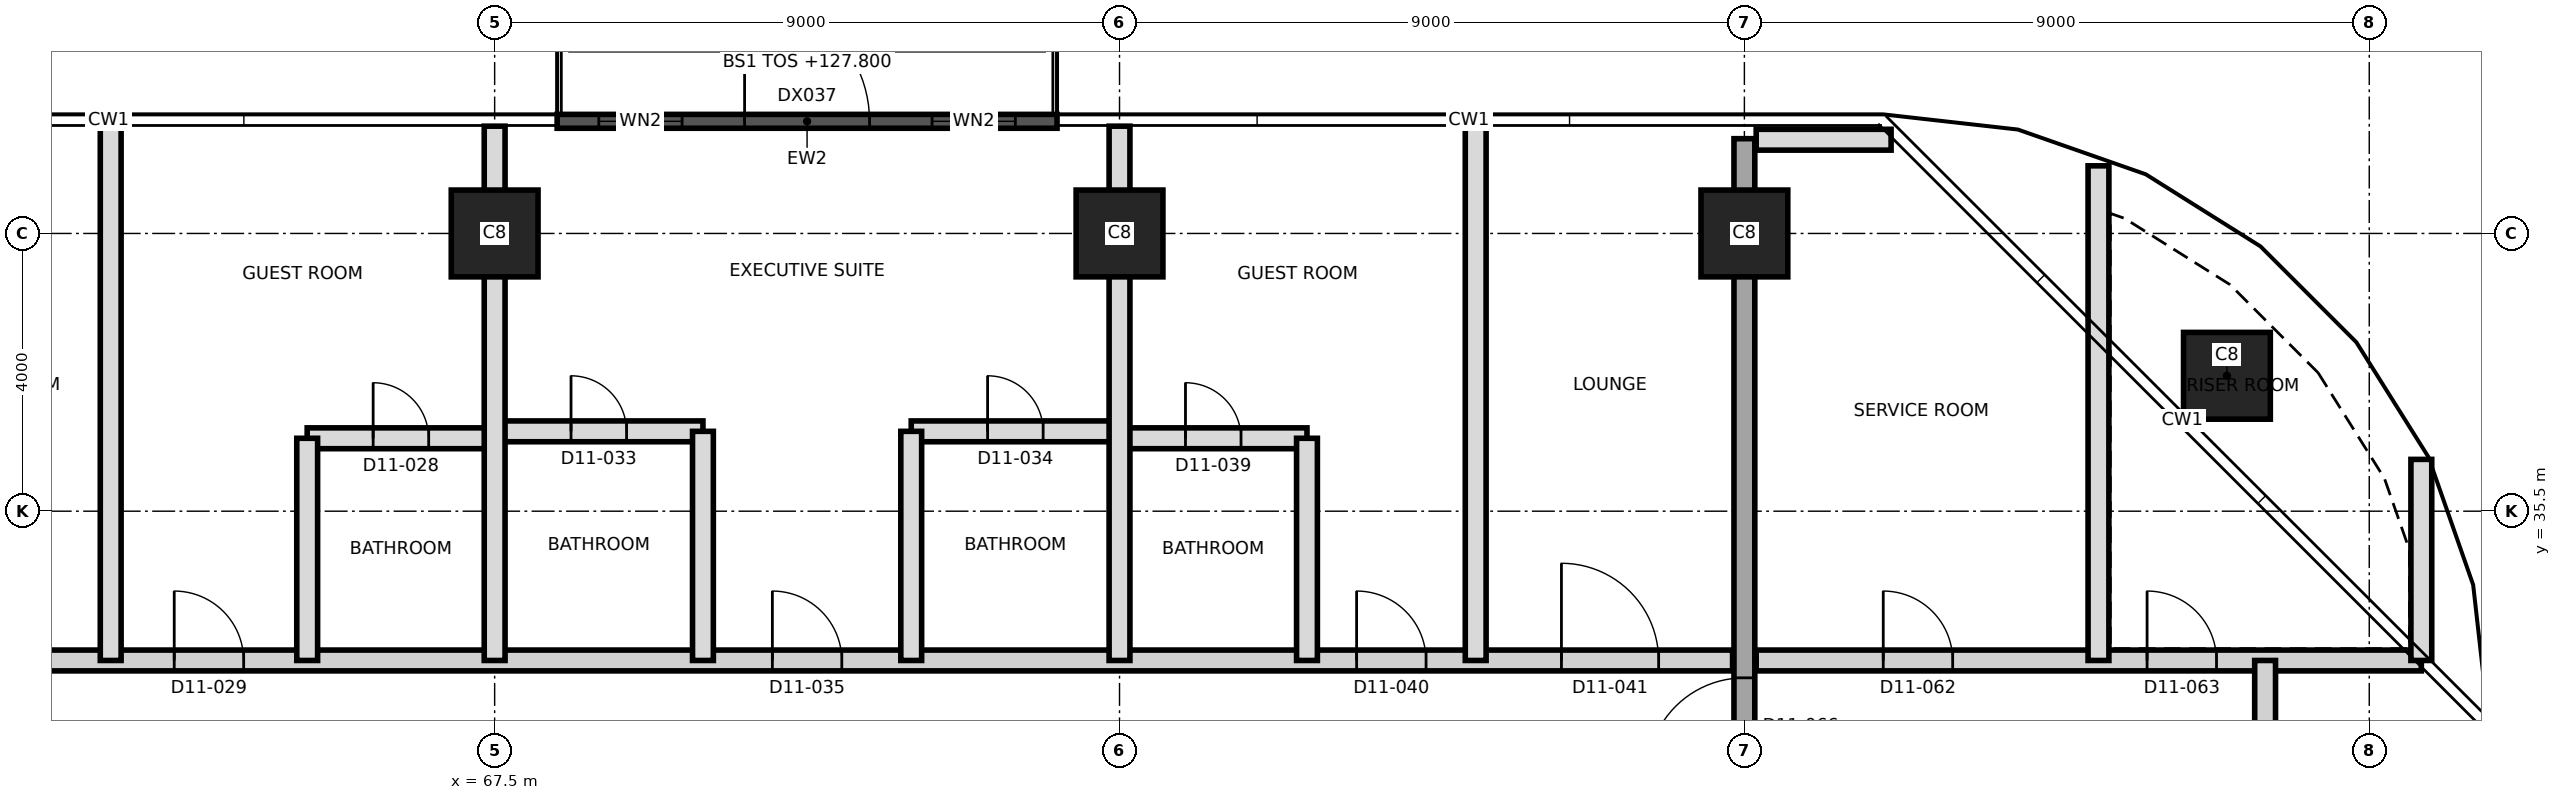
"""IFC4 building model, lengths in metres.
Left out: names, types, materials, properties, quantities, classifications, styles, units other than length and angle.
Written with IfcOpenShell. Run it as: python <this file> out.ifc"""

import sys

from ifc_helpers import new_model, si_unit, direction, frame, frame_2d, origin, origin_2d, place, context, subcontext, project, spatial, rectangle, extrude, element, fill, save


model = new_model("IFC4")
c1 = context("Model", 3, precision=1e-05, world=origin(), true_north=direction((0.0, 1.0)))
c2 = subcontext(c1, "Body", "Model", "MODEL_VIEW")
j1 = project(units=[si_unit("LENGTHUNIT", "METRE"), si_unit("PLANEANGLEUNIT", "RADIAN")], contexts=[c1])
p1 = place(None, origin())
s1 = spatial("IfcSite", under=j1, at=p1, CompositionType="ELEMENT")
p2 = place(p1, origin())
s2 = spatial("IfcBuilding", under=s1, at=p2, CompositionType="ELEMENT")
p3 = place(p2, frame((0.0, 0.0, 127.8)))
s3 = spatial("IfcBuildingStorey", under=s2, at=p3, CompositionType="ELEMENT", Elevation=127.8)
for number, where, z_axis, x_axis in (
    (1, (92.45, 37.45, 0.0), (0.0, 0.0, 1.0), (1.0, 0.0, 0.0)),
    (2, (67.5, 39.5, 0.0), (0.0, 0.0, 1.0), (1.0, 0.0, 0.0)),
    (3, (76.5, 39.5, 0.0), (0.0, 0.0, 1.0), (1.0, 0.0, 0.0)),
    (4, (85.5, 39.5, 0.0), (0.0, 0.0, 1.0), (1.0, 0.0, 0.0)),
):
    element("IfcColumn", number, at=place(p3, frame(where, z_axis=z_axis, x_axis=x_axis)), inside=s3, PredefinedType="COLUMN", context=c2, shape_type="SweptSolid", body=[
        extrude(rectangle(XDim=1.25, YDim=1.25, at=origin_2d()), origin(), (0.0, 0.0, 1.0), 3.7),
    ])
p4 = place(p3, frame((85.5, 20.135, 0.0), z_axis=(0.0, 0.0, 1.0), x_axis=(0.0, 1.0, 0.0)))
e5 = element("IfcWall", 5, at=p4, inside=s3, PredefinedType="SHEAR", context=c2, shape_type="SweptSolid", body=[
    extrude(rectangle(XDim=20.73, YDim=0.3, at=frame_2d((10.365, 0.0))), origin(), (0.0, 0.0, 1.0), 3.7),
])
p5 = place(p4, frame((11.565, 0.0, 0.0)))
e6 = element("IfcOpeningElement", 6, at=p5, cuts=e5, PredefinedType="OPENING", context=c2, shape_type="SweptSolid", body=[
    extrude(rectangle(XDim=1.4, YDim=2.1, at=frame_2d((0.7, 1.05))), frame((0.0, 0.16, 0.0), z_axis=(0.0, -1.0, 0.0), x_axis=(1.0, 0.0, 0.0)), (0.0, 0.0, 1.0), 0.32),
])
p6 = place(p3, frame((68.4, 41.115, 0.0), z_axis=(0.0, 0.0, 1.0), x_axis=(1.0, 0.0, 0.0)))
e7 = element("IfcWall", 7, at=p6, inside=s3, PredefinedType="SOLIDWALL", context=c2, shape_type="SweptSolid", body=[
    extrude(rectangle(XDim=7.2, YDim=0.2, at=frame_2d((3.6, 0.0))), origin(), (0.0, 0.0, 1.0), 3.4),
])
p7 = place(p6, frame((2.7, 0.0, 0.0)))
e8 = element("IfcOpeningElement", 8, at=p7, cuts=e7, PredefinedType="OPENING", context=c2, shape_type="SweptSolid", body=[
    extrude(rectangle(XDim=1.8, YDim=2.4, at=frame_2d((0.9, 1.2))), frame((0.0, 0.11, 0.0), z_axis=(0.0, -1.0, 0.0), x_axis=(1.0, 0.0, 0.0)), (0.0, 0.0, 1.0), 0.22),
])
p8 = place(p6, frame((5.4, 0.0, 0.9)))
e9 = element("IfcOpeningElement", 9, at=p8, cuts=e7, PredefinedType="OPENING", context=c2, shape_type="SweptSolid", body=[
    extrude(rectangle(XDim=1.2, YDim=2.1, at=frame_2d((0.6, 1.05))), frame((0.0, 0.11, 0.0), z_axis=(0.0, -1.0, 0.0), x_axis=(1.0, 0.0, 0.0)), (0.0, 0.0, 1.0), 0.22),
])
p9 = place(p6, frame((0.6, 0.0, 0.9)))
e10 = element("IfcOpeningElement", 10, at=p9, cuts=e7, PredefinedType="OPENING", context=c2, shape_type="SweptSolid", body=[
    extrude(rectangle(XDim=1.2, YDim=2.1, at=frame_2d((0.6, 1.05))), frame((0.0, 0.11, 0.0), z_axis=(0.0, -1.0, 0.0), x_axis=(1.0, 0.0, 0.0)), (0.0, 0.0, 1.0), 0.22),
])
p10 = place(p3, frame((58.8, 33.35, 0.0), z_axis=(0.0, 0.0, 1.0), x_axis=(1.0, 0.0, 0.0)))
e11 = element("IfcWall", 11, at=p10, inside=s3, PredefinedType="PARTITIONING", context=c2, shape_type="SweptSolid", body=[
    extrude(rectangle(XDim=26.53, YDim=0.3, at=frame_2d((13.265, 0.0))), origin(), (0.0, 0.0, 1.0), 3.4),
])
p11 = place(p10, frame((0.835, 0.0, 0.0)))
e12 = element("IfcOpeningElement", 12, at=p11, cuts=e11, PredefinedType="OPENING", context=c2, shape_type="SweptSolid", body=[
    extrude(rectangle(XDim=1.2, YDim=2.1, at=frame_2d((0.6, 1.05))), frame((0.0, 0.16, 0.0), z_axis=(0.0, -1.0, 0.0), x_axis=(1.0, 0.0, 0.0)), (0.0, 0.0, 1.0), 0.32),
])
p12 = place(p10, frame((4.085, 0.0, 0.0)))
e13 = element("IfcOpeningElement", 13, at=p12, cuts=e11, PredefinedType="OPENING", context=c2, shape_type="SweptSolid", body=[
    extrude(rectangle(XDim=1.0, YDim=2.1, at=frame_2d((0.5, 1.05))), frame((0.0, 0.16, 0.0), z_axis=(0.0, -1.0, 0.0), x_axis=(1.0, 0.0, 0.0)), (0.0, 0.0, 1.0), 0.32),
])
p13 = place(p10, frame((12.7, 0.0, 0.0)))
e14 = element("IfcOpeningElement", 14, at=p13, cuts=e11, PredefinedType="OPENING", context=c2, shape_type="SweptSolid", body=[
    extrude(rectangle(XDim=1.0, YDim=2.4, at=frame_2d((0.5, 1.2))), frame((0.0, 0.16, 0.0), z_axis=(0.0, -1.0, 0.0), x_axis=(1.0, 0.0, 0.0)), (0.0, 0.0, 1.0), 0.32),
])
p14 = place(p10, frame((21.115, 0.0, 0.0)))
e15 = element("IfcOpeningElement", 15, at=p14, cuts=e11, PredefinedType="OPENING", context=c2, shape_type="SweptSolid", body=[
    extrude(rectangle(XDim=1.0, YDim=2.1, at=frame_2d((0.5, 1.05))), frame((0.0, 0.16, 0.0), z_axis=(0.0, -1.0, 0.0), x_axis=(1.0, 0.0, 0.0)), (0.0, 0.0, 1.0), 0.32),
])
p15 = place(p10, frame((24.065, 0.0, 0.0)))
e16 = element("IfcOpeningElement", 16, at=p15, cuts=e11, PredefinedType="OPENING", context=c2, shape_type="SweptSolid", body=[
    extrude(rectangle(XDim=1.4, YDim=2.1, at=frame_2d((0.7, 1.05))), frame((0.0, 0.16, 0.0), z_axis=(0.0, -1.0, 0.0), x_axis=(1.0, 0.0, 0.0)), (0.0, 0.0, 1.0), 0.32),
])
p16 = place(p3, frame((85.67, 33.35, 0.0), z_axis=(0.0, 0.0, 1.0), x_axis=(1.0, 0.0, 0.0)))
e17 = element("IfcWall", 17, at=p16, inside=s3, PredefinedType="PARTITIONING", context=c2, shape_type="SweptSolid", body=[
    extrude(rectangle(XDim=9.58, YDim=0.3, at=frame_2d((4.79, 0.0))), origin(), (0.0, 0.0, 1.0), 3.4),
])
p17 = place(p16, frame((1.83, 0.0, 0.0)))
e18 = element("IfcOpeningElement", 18, at=p17, cuts=e17, PredefinedType="OPENING", context=c2, shape_type="SweptSolid", body=[
    extrude(rectangle(XDim=1.0, YDim=2.1, at=frame_2d((0.5, 1.05))), frame((0.0, 0.16, 0.0), z_axis=(0.0, -1.0, 0.0), x_axis=(1.0, 0.0, 0.0)), (0.0, 0.0, 1.0), 0.32),
])
p18 = place(p16, frame((5.63, 0.0, 0.0)))
e19 = element("IfcOpeningElement", 19, at=p18, cuts=e17, PredefinedType="OPENING", context=c2, shape_type="SweptSolid", body=[
    extrude(rectangle(XDim=1.0, YDim=2.1, at=frame_2d((0.5, 1.05))), frame((0.0, 0.16, 0.0), z_axis=(0.0, -1.0, 0.0), x_axis=(1.0, 0.0, 0.0)), (0.0, 0.0, 1.0), 0.32),
])
p19 = place(p3, frame((64.8, 36.55, 0.0), z_axis=(0.0, 0.0, 1.0), x_axis=(1.0, 0.0, 0.0)))
e20 = element("IfcWall", 20, at=p19, inside=s3, PredefinedType="PARTITIONING", context=c2, shape_type="SweptSolid", body=[
    extrude(rectangle(XDim=2.7, YDim=0.3, at=frame_2d((1.35, 0.0))), origin(), (0.0, 0.0, 1.0), 3.4),
])
p20 = place(p19, frame((0.95, 0.0, 0.0)))
e21 = element("IfcOpeningElement", 21, at=p20, cuts=e20, PredefinedType="OPENING", context=c2, shape_type="SweptSolid", body=[
    extrude(rectangle(XDim=0.8, YDim=2.1, at=frame_2d((0.4, 1.05))), frame((0.0, 0.16, 0.0), z_axis=(0.0, -1.0, 0.0), x_axis=(1.0, 0.0, 0.0)), (0.0, 0.0, 1.0), 0.32),
])
p21 = place(p3, frame((76.5, 36.55, 0.0), z_axis=(0.0, 0.0, 1.0), x_axis=(1.0, 0.0, 0.0)))
e22 = element("IfcWall", 22, at=p21, inside=s3, PredefinedType="PARTITIONING", context=c2, shape_type="SweptSolid", body=[
    extrude(rectangle(XDim=2.7, YDim=0.3, at=frame_2d((1.35, 0.0))), origin(), (0.0, 0.0, 1.0), 3.4),
])
p22 = place(p21, frame((0.95, 0.0, 0.0)))
e23 = element("IfcOpeningElement", 23, at=p22, cuts=e22, PredefinedType="OPENING", context=c2, shape_type="SweptSolid", body=[
    extrude(rectangle(XDim=0.8, YDim=2.1, at=frame_2d((0.4, 1.05))), frame((0.0, 0.16, 0.0), z_axis=(0.0, -1.0, 0.0), x_axis=(1.0, 0.0, 0.0)), (0.0, 0.0, 1.0), 0.32),
])
p23 = place(p3, frame((67.5, 36.65, 0.0), z_axis=(0.0, 0.0, 1.0), x_axis=(1.0, 0.0, 0.0)))
e24 = element("IfcWall", 24, at=p23, inside=s3, PredefinedType="PARTITIONING", context=c2, shape_type="SweptSolid", body=[
    extrude(rectangle(XDim=3.0, YDim=0.3, at=frame_2d((1.5, 0.0))), origin(), (0.0, 0.0, 1.0), 3.4),
])
p24 = place(p23, frame((1.1, 0.0, 0.0)))
e25 = element("IfcOpeningElement", 25, at=p24, cuts=e24, PredefinedType="OPENING", context=c2, shape_type="SweptSolid", body=[
    extrude(rectangle(XDim=0.8, YDim=2.1, at=frame_2d((0.4, 1.05))), frame((0.0, 0.16, 0.0), z_axis=(0.0, -1.0, 0.0), x_axis=(1.0, 0.0, 0.0)), (0.0, 0.0, 1.0), 0.32),
])
p25 = place(p3, frame((73.5, 36.65, 0.0), z_axis=(0.0, 0.0, 1.0), x_axis=(1.0, 0.0, 0.0)))
e26 = element("IfcWall", 26, at=p25, inside=s3, PredefinedType="PARTITIONING", context=c2, shape_type="SweptSolid", body=[
    extrude(rectangle(XDim=3.0, YDim=0.3, at=frame_2d((1.5, 0.0))), origin(), (0.0, 0.0, 1.0), 3.4),
])
p26 = place(p25, frame((1.1, 0.0, 0.0)))
e27 = element("IfcOpeningElement", 27, at=p26, cuts=e26, PredefinedType="OPENING", context=c2, shape_type="SweptSolid", body=[
    extrude(rectangle(XDim=0.8, YDim=2.1, at=frame_2d((0.4, 1.05))), frame((0.0, 0.16, 0.0), z_axis=(0.0, -1.0, 0.0), x_axis=(1.0, 0.0, 0.0)), (0.0, 0.0, 1.0), 0.32),
])
p27 = place(p3, frame((85.67, 40.85, 0.0), z_axis=(0.0, 0.0, 1.0), x_axis=(1.0, 0.0, 0.0)))
e28 = element("IfcWall", 28, at=p27, inside=s3, PredefinedType="PARTITIONING", context=c2, shape_type="SweptSolid", body=[
    extrude(rectangle(XDim=1.943, YDim=0.3, at=frame_2d((0.972, 0.0))), origin(), (0.0, 0.0, 1.0), 3.4),
])
p28 = place(p3, frame((61.97, 33.35, 0.0), z_axis=(0.0, 0.0, 1.0), x_axis=(0.0, 1.0, 0.0)))
e29 = element("IfcWall", 29, at=p28, inside=s3, PredefinedType="PARTITIONING", context=c2, shape_type="SweptSolid", body=[
    extrude(rectangle(XDim=7.695, YDim=0.3, at=frame_2d((3.847, 0.0))), origin(), (0.0, 0.0, 1.0), 3.4),
])
p29 = place(p3, frame((64.8, 33.35, 0.0), z_axis=(0.0, 0.0, 1.0), x_axis=(0.0, 1.0, 0.0)))
e30 = element("IfcWall", 30, at=p29, inside=s3, PredefinedType="PARTITIONING", context=c2, shape_type="SweptSolid", body=[
    extrude(rectangle(XDim=3.2, YDim=0.3, at=frame_2d((1.6, 0.0))), origin(), (0.0, 0.0, 1.0), 3.4),
])
p30 = place(p3, frame((67.5, 33.35, 0.0), z_axis=(0.0, 0.0, 1.0), x_axis=(0.0, 1.0, 0.0)))
e31 = element("IfcWall", 31, at=p30, inside=s3, PredefinedType="PARTITIONING", context=c2, shape_type="SweptSolid", body=[
    extrude(rectangle(XDim=7.695, YDim=0.3, at=frame_2d((3.847, 0.0))), origin(), (0.0, 0.0, 1.0), 3.4),
])
for number, where, z_axis, x_axis in (
    (32, (70.5, 33.35, 0.0), (0.0, 0.0, 1.0), (0.0, 1.0, 0.0)),
    (33, (73.5, 33.35, 0.0), (0.0, 0.0, 1.0), (0.0, 1.0, 0.0)),
):
    element("IfcWall", number, at=place(p3, frame(where, z_axis=z_axis, x_axis=x_axis)), inside=s3, PredefinedType="PARTITIONING", context=c2, shape_type="SweptSolid", body=[
        extrude(rectangle(XDim=3.3, YDim=0.3, at=frame_2d((1.65, 0.0))), origin(), (0.0, 0.0, 1.0), 3.4),
    ])
p31 = place(p3, frame((76.5, 33.35, 0.0), z_axis=(0.0, 0.0, 1.0), x_axis=(0.0, 1.0, 0.0)))
e34 = element("IfcWall", 34, at=p31, inside=s3, PredefinedType="PARTITIONING", context=c2, shape_type="SweptSolid", body=[
    extrude(rectangle(XDim=7.695, YDim=0.3, at=frame_2d((3.847, 0.0))), origin(), (0.0, 0.0, 1.0), 3.4),
])
p32 = place(p3, frame((79.2, 33.35, 0.0), z_axis=(0.0, 0.0, 1.0), x_axis=(0.0, 1.0, 0.0)))
e35 = element("IfcWall", 35, at=p32, inside=s3, PredefinedType="PARTITIONING", context=c2, shape_type="SweptSolid", body=[
    extrude(rectangle(XDim=3.2, YDim=0.3, at=frame_2d((1.6, 0.0))), origin(), (0.0, 0.0, 1.0), 3.4),
])
p33 = place(p3, frame((81.63, 33.35, 0.0), z_axis=(0.0, 0.0, 1.0), x_axis=(0.0, 1.0, 0.0)))
e36 = element("IfcWall", 36, at=p33, inside=s3, PredefinedType="PARTITIONING", context=c2, shape_type="SweptSolid", body=[
    extrude(rectangle(XDim=7.695, YDim=0.3, at=frame_2d((3.847, 0.0))), origin(), (0.0, 0.0, 1.0), 3.4),
])
p34 = place(p3, frame((90.6, 33.35, 0.0), z_axis=(0.0, 0.0, 1.0), x_axis=(0.0, 1.0, 0.0)))
e37 = element("IfcWall", 37, at=p34, inside=s3, PredefinedType="PARTITIONING", context=c2, shape_type="SweptSolid", body=[
    extrude(rectangle(XDim=7.124, YDim=0.3, at=frame_2d((3.562, 0.0))), origin(), (0.0, 0.0, 1.0), 3.4),
])
p35 = place(p3, frame((93.0, 30.65, 0.0), z_axis=(0.0, 0.0, 1.0), x_axis=(0.0, 1.0, 0.0)))
e38 = element("IfcWall", 38, at=p35, inside=s3, PredefinedType="PARTITIONING", context=c2, shape_type="SweptSolid", body=[
    extrude(rectangle(XDim=2.7, YDim=0.3, at=frame_2d((1.35, 0.0))), origin(), (0.0, 0.0, 1.0), 3.4),
])
p36 = place(p3, frame((95.25, 33.35, 0.0), z_axis=(0.0, 0.0, 1.0), x_axis=(0.0, 1.0, 0.0)))
e39 = element("IfcWall", 39, at=p36, inside=s3, PredefinedType="PARTITIONING", context=c2, shape_type="SweptSolid", body=[
    extrude(rectangle(XDim=2.896, YDim=0.3, at=frame_2d((1.448, 0.0))), origin(), (0.0, 0.0, 1.0), 3.4),
])
p37 = place(p7, origin())
e40 = element("IfcDoor", 40, at=p37, inside=s3, OperationType="SINGLE_SWING_LEFT", PredefinedType="DOOR", context=c2, shape_type="SweptSolid", body=[
    extrude(rectangle(XDim=1.8, YDim=2.4, at=frame_2d((0.9, 1.2))), frame((0.0, 0.025, 0.0), z_axis=(0.0, -1.0, 0.0), x_axis=(1.0, 0.0, 0.0)), (0.0, 0.0, 1.0), 0.05),
])
fill(e8, e40)
p38 = place(p8, origin())
e41 = element("IfcWindow", 41, at=p38, inside=s3, PartitioningType="SINGLE_PANEL", PredefinedType="WINDOW", context=c2, shape_type="SweptSolid", body=[
    extrude(rectangle(XDim=1.2, YDim=2.1, at=frame_2d((0.6, 1.05))), frame((0.0, 0.03, 0.0), z_axis=(0.0, -1.0, 0.0), x_axis=(1.0, 0.0, 0.0)), (0.0, 0.0, 1.0), 0.06),
])
fill(e9, e41)
p39 = place(p9, origin())
e42 = element("IfcWindow", 42, at=p39, inside=s3, PartitioningType="SINGLE_PANEL", PredefinedType="WINDOW", context=c2, shape_type="SweptSolid", body=[
    extrude(rectangle(XDim=1.2, YDim=2.1, at=frame_2d((0.6, 1.05))), frame((0.0, 0.03, 0.0), z_axis=(0.0, -1.0, 0.0), x_axis=(1.0, 0.0, 0.0)), (0.0, 0.0, 1.0), 0.06),
])
fill(e10, e42)
p40 = place(p20, origin())
e43 = element("IfcDoor", 43, at=p40, inside=s3, OperationType="SINGLE_SWING_RIGHT", PredefinedType="DOOR", context=c2, shape_type="SweptSolid", body=[
    extrude(rectangle(XDim=0.8, YDim=2.1, at=frame_2d((0.4, 1.05))), frame((0.0, 0.025, 0.0), z_axis=(0.0, -1.0, 0.0), x_axis=(1.0, 0.0, 0.0)), (0.0, 0.0, 1.0), 0.05),
])
fill(e21, e43)
p41 = place(p12, origin())
e44 = element("IfcDoor", 44, at=p41, inside=s3, OperationType="SINGLE_SWING_LEFT", PredefinedType="DOOR", context=c2, shape_type="SweptSolid", body=[
    extrude(rectangle(XDim=1.0, YDim=2.1, at=frame_2d((0.5, 1.05))), frame((0.0, 0.025, 0.0), z_axis=(0.0, -1.0, 0.0), x_axis=(1.0, 0.0, 0.0)), (0.0, 0.0, 1.0), 0.05),
])
fill(e13, e44)
p42 = place(p24, origin())
e45 = element("IfcDoor", 45, at=p42, inside=s3, OperationType="SINGLE_SWING_LEFT", PredefinedType="DOOR", context=c2, shape_type="SweptSolid", body=[
    extrude(rectangle(XDim=0.8, YDim=2.1, at=frame_2d((0.4, 1.05))), frame((0.0, 0.025, 0.0), z_axis=(0.0, -1.0, 0.0), x_axis=(1.0, 0.0, 0.0)), (0.0, 0.0, 1.0), 0.05),
])
fill(e25, e45)
p43 = place(p26, origin())
e46 = element("IfcDoor", 46, at=p43, inside=s3, OperationType="SINGLE_SWING_RIGHT", PredefinedType="DOOR", context=c2, shape_type="SweptSolid", body=[
    extrude(rectangle(XDim=0.8, YDim=2.1, at=frame_2d((0.4, 1.05))), frame((0.0, 0.025, 0.0), z_axis=(0.0, -1.0, 0.0), x_axis=(1.0, 0.0, 0.0)), (0.0, 0.0, 1.0), 0.05),
])
fill(e27, e46)
p44 = place(p13, origin())
e47 = element("IfcDoor", 47, at=p44, inside=s3, OperationType="SINGLE_SWING_LEFT", PredefinedType="DOOR", context=c2, shape_type="SweptSolid", body=[
    extrude(rectangle(XDim=1.0, YDim=2.4, at=frame_2d((0.5, 1.2))), frame((0.0, 0.025, 0.0), z_axis=(0.0, -1.0, 0.0), x_axis=(1.0, 0.0, 0.0)), (0.0, 0.0, 1.0), 0.05),
])
fill(e14, e47)
p45 = place(p22, origin())
e48 = element("IfcDoor", 48, at=p45, inside=s3, OperationType="SINGLE_SWING_LEFT", PredefinedType="DOOR", context=c2, shape_type="SweptSolid", body=[
    extrude(rectangle(XDim=0.8, YDim=2.1, at=frame_2d((0.4, 1.05))), frame((0.0, 0.025, 0.0), z_axis=(0.0, -1.0, 0.0), x_axis=(1.0, 0.0, 0.0)), (0.0, 0.0, 1.0), 0.05),
])
fill(e23, e48)
p46 = place(p14, origin())
e49 = element("IfcDoor", 49, at=p46, inside=s3, OperationType="SINGLE_SWING_LEFT", PredefinedType="DOOR", context=c2, shape_type="SweptSolid", body=[
    extrude(rectangle(XDim=1.0, YDim=2.1, at=frame_2d((0.5, 1.05))), frame((0.0, 0.025, 0.0), z_axis=(0.0, -1.0, 0.0), x_axis=(1.0, 0.0, 0.0)), (0.0, 0.0, 1.0), 0.05),
])
fill(e15, e49)
p47 = place(p15, origin())
e50 = element("IfcDoor", 50, at=p47, inside=s3, OperationType="SINGLE_SWING_RIGHT", PredefinedType="DOOR", context=c2, shape_type="SweptSolid", body=[
    extrude(rectangle(XDim=1.4, YDim=2.1, at=frame_2d((0.7, 1.05))), frame((0.0, 0.025, 0.0), z_axis=(0.0, -1.0, 0.0), x_axis=(1.0, 0.0, 0.0)), (0.0, 0.0, 1.0), 0.05),
])
fill(e16, e50)
p48 = place(p17, origin())
e51 = element("IfcDoor", 51, at=p48, inside=s3, OperationType="SINGLE_SWING_LEFT", PredefinedType="DOOR", context=c2, shape_type="SweptSolid", body=[
    extrude(rectangle(XDim=1.0, YDim=2.1, at=frame_2d((0.5, 1.05))), frame((0.0, 0.025, 0.0), z_axis=(0.0, -1.0, 0.0), x_axis=(1.0, 0.0, 0.0)), (0.0, 0.0, 1.0), 0.05),
])
fill(e18, e51)
p49 = place(p18, origin())
e52 = element("IfcDoor", 52, at=p49, inside=s3, OperationType="SINGLE_SWING_RIGHT", PredefinedType="DOOR", context=c2, shape_type="SweptSolid", body=[
    extrude(rectangle(XDim=1.0, YDim=2.1, at=frame_2d((0.5, 1.05))), frame((0.0, 0.025, 0.0), z_axis=(0.0, -1.0, 0.0), x_axis=(1.0, 0.0, 0.0)), (0.0, 0.0, 1.0), 0.05),
])
fill(e19, e52)
p50 = place(p5, origin())
e53 = element("IfcDoor", 53, at=p50, inside=s3, OperationType="SINGLE_SWING_RIGHT", PredefinedType="DOOR", context=c2, shape_type="SweptSolid", body=[
    extrude(rectangle(XDim=1.4, YDim=2.1, at=frame_2d((0.7, 1.05))), frame((0.0, 0.025, 0.0), z_axis=(0.0, -1.0, 0.0), x_axis=(1.0, 0.0, 0.0)), (0.0, 0.0, 1.0), 0.05),
])
fill(e6, e53)
save(model, sys.argv[1])
